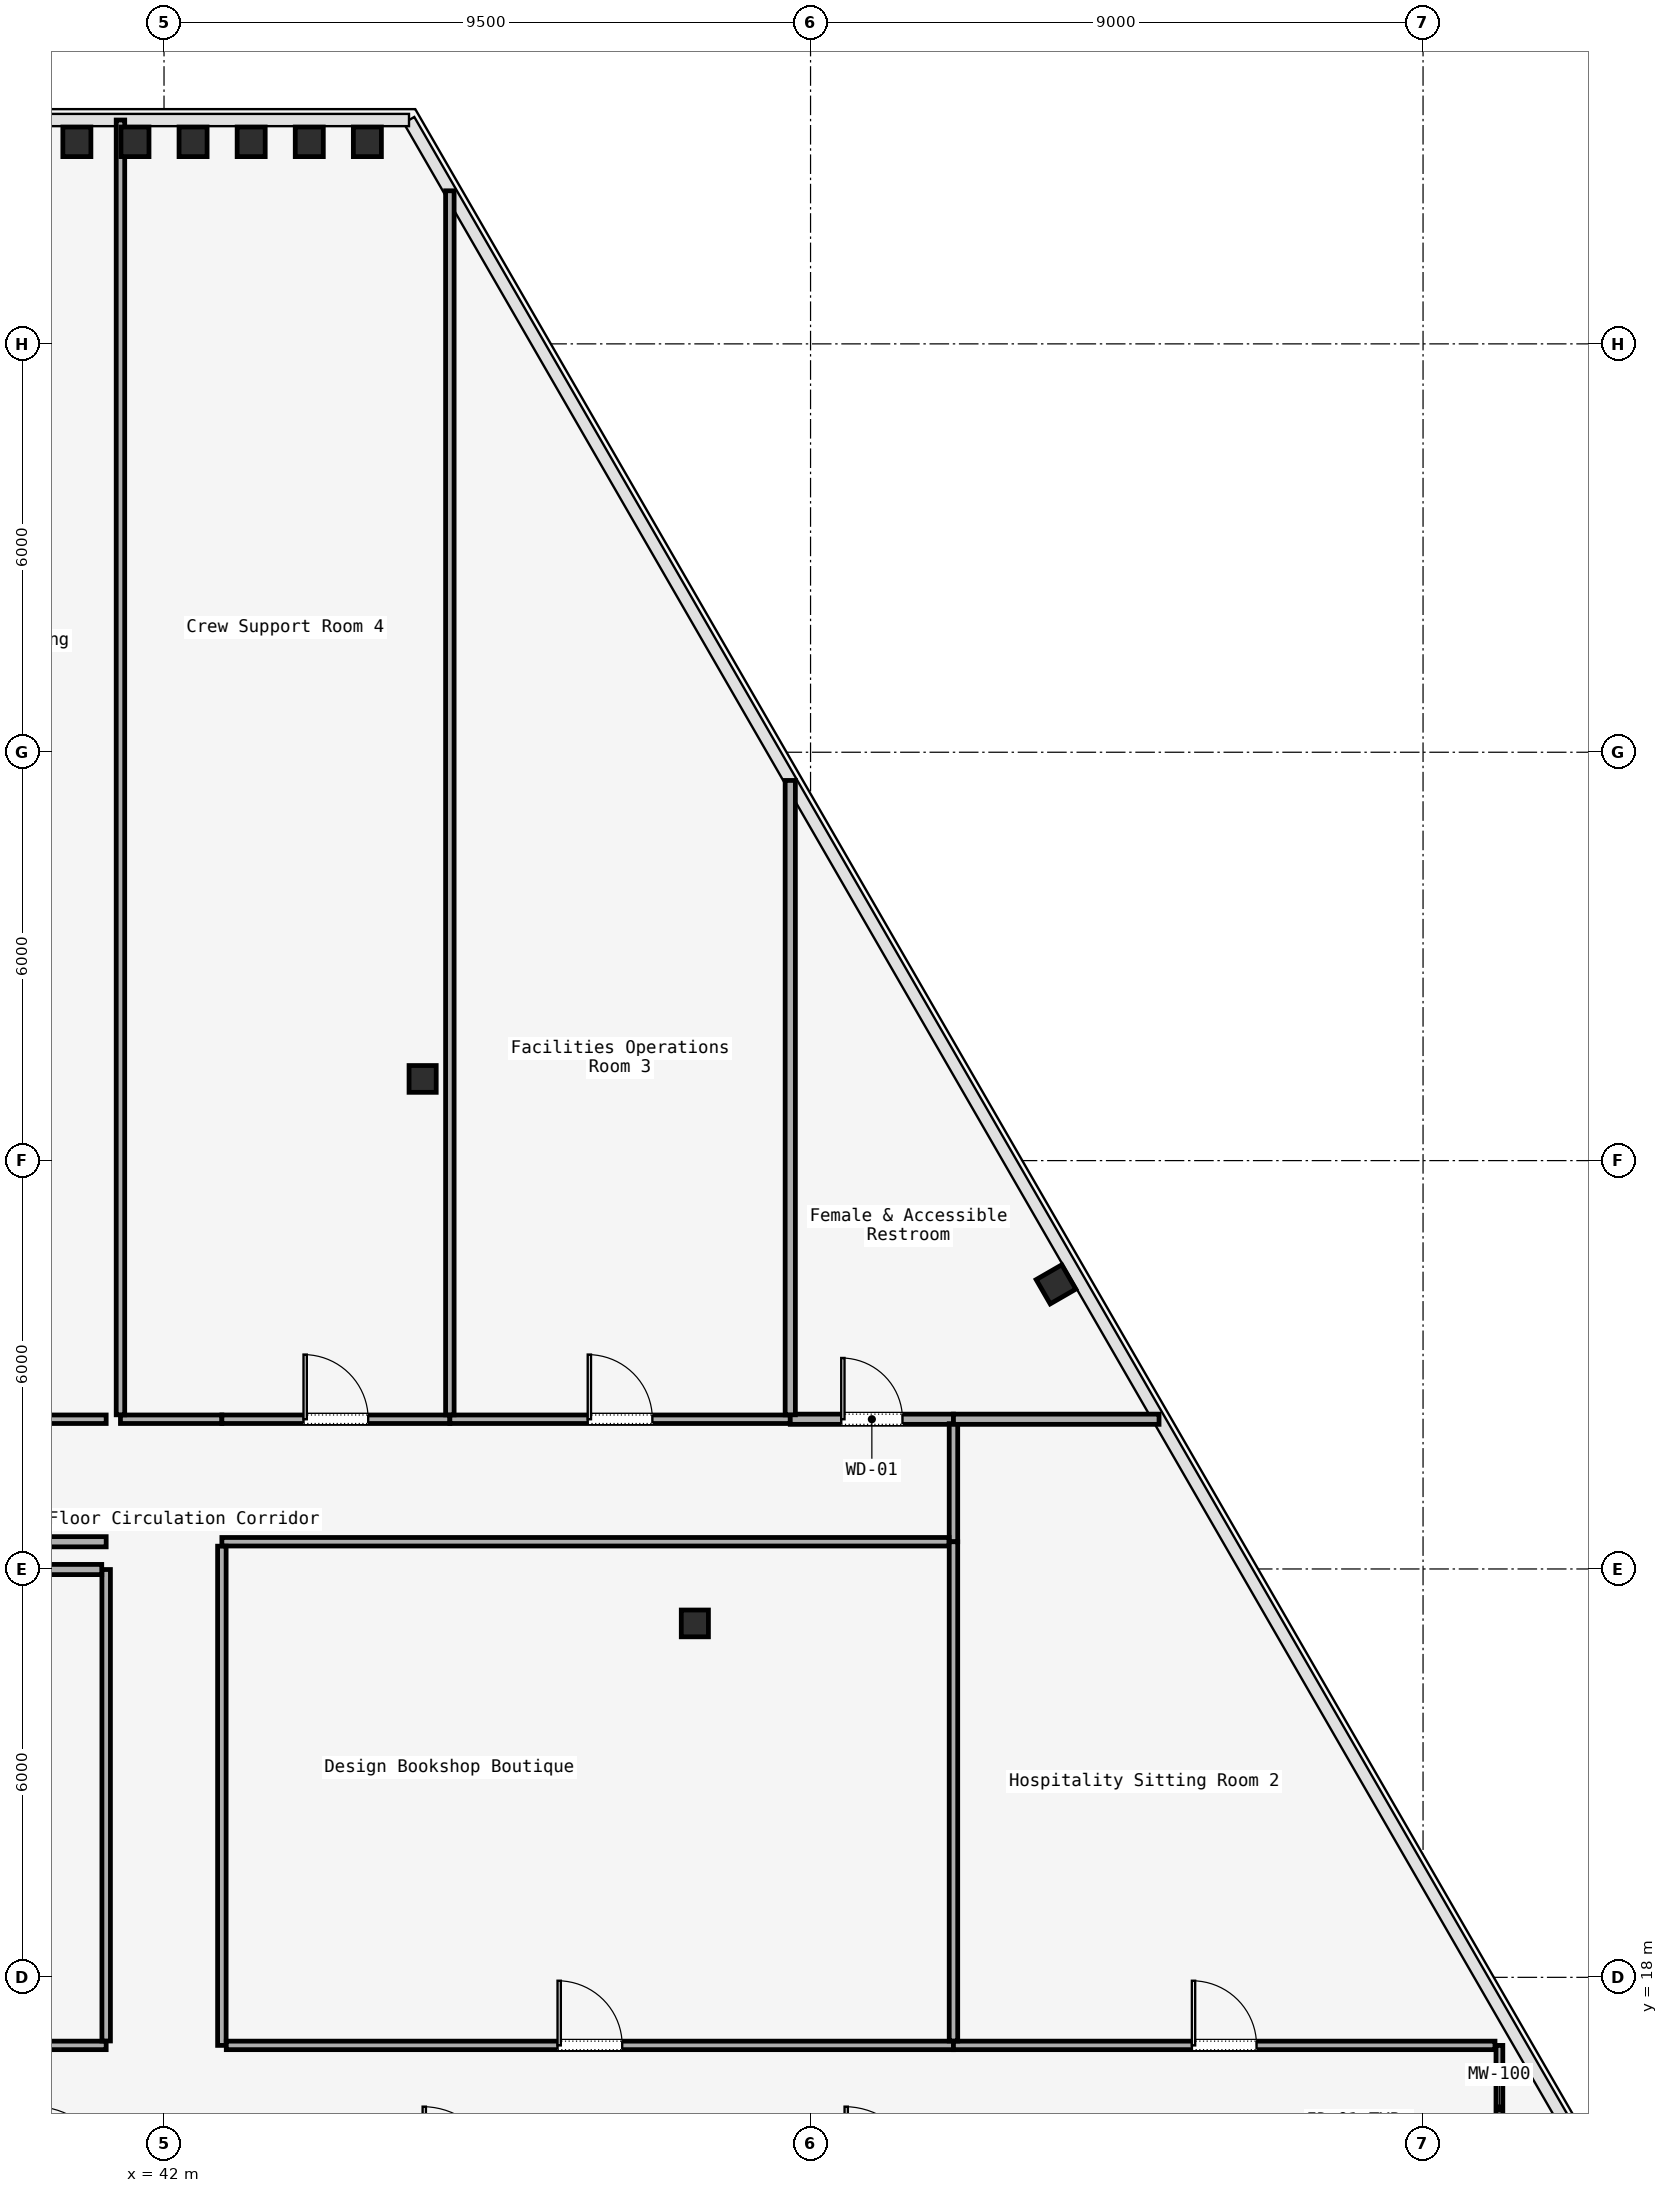
"""IFC4 building model, lengths in metres.
Left out: names, types, materials, properties, quantities, classifications, styles, units other than length and angle.
Written with IfcOpenShell. Run it as: python <this file> out.ifc"""

import sys

from ifc_helpers import new_model, si_unit, direction, frame, frame_2d, origin, origin_2d, place, context, subcontext, project, spatial, rectangle, i_section, extrude, element, fill, save


model = new_model("IFC4")
c1 = context("Model", 3, precision=1e-05, world=origin(), true_north=direction((0.0, 1.0)))
c2 = subcontext(c1, "Body", "Model", "MODEL_VIEW")
j1 = project(units=[si_unit("LENGTHUNIT", "METRE"), si_unit("PLANEANGLEUNIT", "RADIAN")], contexts=[c1])
p1 = place(None, origin())
s1 = spatial("IfcSite", under=j1, at=p1, CompositionType="ELEMENT")
p2 = place(p1, origin())
s2 = spatial("IfcBuilding", under=s1, at=p2, CompositionType="ELEMENT")
p3 = place(p2, frame((0.0, 0.0, 233.2)))
s3 = spatial("IfcBuildingStorey", under=s2, at=p3, CompositionType="ELEMENT", Elevation=233.2)
for number, where, z_axis, x_axis in (
    (1, (49.8, 23.2, 0.0), (0.0, 0.0, 1.0), (1.0, 0.0, 0.0)),
    (2, (45.8, 31.2, 0.0), (0.0, 0.0, 1.0), (1.0, 0.0, 0.0)),
):
    element("IfcColumn", number, at=place(p3, frame(where, z_axis=z_axis, x_axis=x_axis)), inside=s3, PredefinedType="COLUMN", context=c2, shape_type="SweptSolid", body=[
        extrude(i_section(OverallWidth=0.399, OverallDepth=0.394, WebThickness=0.023, FlangeThickness=0.037, FilletRadius=0.015, at=origin_2d()), origin(), (0.0, 0.0, 1.0), 3.58),
    ])
for number, where, z_axis, x_axis in (
    (3, (55.107, 28.182, 0.0), (0.0, 0.0, 1.0), (-0.5, 0.866, 0.0)),
    (4, (44.988, 44.969, 0.0), (0.0, 0.0, 1.0), (1.0, 0.0, 0.0)),
    (5, (44.135, 44.969, 0.0), (0.0, 0.0, 1.0), (1.0, 0.0, 0.0)),
    (6, (43.281, 44.969, 0.0), (0.0, 0.0, 1.0), (1.0, 0.0, 0.0)),
    (7, (42.427, 44.969, 0.0), (0.0, 0.0, 1.0), (1.0, 0.0, 0.0)),
    (8, (41.573, 44.969, 0.0), (0.0, 0.0, 1.0), (1.0, 0.0, 0.0)),
    (9, (40.719, 44.969, 0.0), (0.0, 0.0, 1.0), (1.0, 0.0, 0.0)),
):
    element("IfcColumn", number, at=place(p3, frame(where, z_axis=z_axis, x_axis=x_axis)), inside=s3, PredefinedType="COLUMN", context=c2, shape_type="SweptSolid", body=[
        extrude(i_section(OverallWidth=0.412, OverallDepth=0.435, WebThickness=0.036, FlangeThickness=0.044, FilletRadius=0.015, at=origin_2d()), origin(), (0.0, 0.0, 1.0), 3.58),
    ])
p4 = place(p3, frame((61.622, 17.0, 0.0), z_axis=(0.0, 0.0, 1.0), x_axis=(0.0, -1.0, 0.0)))
e10 = element("IfcWall", 10, at=p4, inside=s3, PredefinedType="MOVABLE", context=c2, shape_type="SweptSolid", body=[
    extrude(rectangle(XDim=1.85, YDim=0.1, at=frame_2d((0.925, 0.0))), origin(), (0.0, 0.0, 1.0), 3.01),
])
p5 = place(p3, frame((30.8, 17.0, 0.0), z_axis=(0.0, 0.0, 1.0), x_axis=(1.0, 0.0, 0.0)))
e11 = element("IfcWall", 11, at=p5, inside=s3, PredefinedType="PARTITIONING", context=c2, shape_type="SweptSolid", body=[
    extrude(rectangle(XDim=10.35, YDim=0.125, at=frame_2d((5.175, 0.0))), origin(), (0.0, 0.0, 1.0), 3.01),
])
p6 = place(p5, frame((4.7, 0.0, 0.0)))
e12 = element("IfcOpeningElement", 12, at=p6, cuts=e11, PredefinedType="OPENING", context=c2, shape_type="SweptSolid", body=[
    extrude(rectangle(XDim=0.95, YDim=2.2, at=frame_2d((0.475, 1.1))), frame((0.0, 0.062, 0.0), z_axis=(0.0, -1.0, 0.0), x_axis=(1.0, 0.0, 0.0)), (0.0, 0.0, 1.0), 0.125),
])
p7 = place(p3, frame((41.15, 17.065, 0.0), z_axis=(0.0, 0.0, 1.0), x_axis=(0.0, 1.0, 0.0)))
e13 = element("IfcWall", 13, at=p7, inside=s3, PredefinedType="PARTITIONING", context=c2, shape_type="SweptSolid", body=[
    extrude(rectangle(XDim=6.927, YDim=0.125, at=frame_2d((3.463, 0.0))), origin(), (0.0, 0.0, 1.0), 3.01),
])
p8 = place(p3, frame((41.15, 24.4, 0.0), z_axis=(0.0, 0.0, 1.0), x_axis=(-1.0, 0.0, 0.0)))
e14 = element("IfcWall", 14, at=p8, inside=s3, PredefinedType="PARTITIONING", context=c2, shape_type="SweptSolid", body=[
    extrude(rectangle(XDim=5.65, YDim=0.15, at=frame_2d((2.825, 0.0))), origin(), (0.0, 0.0, 1.0), 3.01),
])
p9 = place(p3, frame((37.4, 26.2, 0.0), z_axis=(0.0, 0.0, 1.0), x_axis=(1.0, 0.0, 0.0)))
e15 = element("IfcWall", 15, at=p9, inside=s3, PredefinedType="PARTITIONING", context=c2, shape_type="SweptSolid", body=[
    extrude(rectangle(XDim=3.75, YDim=0.125, at=frame_2d((1.875, 0.0))), origin(), (0.0, 0.0, 1.0), 3.01),
])
p10 = place(p9, frame((1.175, 0.0, 0.0)))
e16 = element("IfcOpeningElement", 16, at=p10, cuts=e15, PredefinedType="OPENING", context=c2, shape_type="SweptSolid", body=[
    extrude(rectangle(XDim=1.4, YDim=2.2, at=frame_2d((0.7, 1.1))), frame((0.0, 0.062, 0.0), z_axis=(0.0, -1.0, 0.0), x_axis=(1.0, 0.0, 0.0)), (0.0, 0.0, 1.0), 0.125),
])
p11 = place(p3, frame((41.36, 26.2, 0.0), z_axis=(0.0, 0.0, 1.0), x_axis=(1.0, 0.0, 0.0)))
e17 = element("IfcWall", 17, at=p11, inside=s3, PredefinedType="PARTITIONING", context=c2, shape_type="SweptSolid", body=[
    extrude(rectangle(XDim=1.49, YDim=0.125, at=frame_2d((0.745, 0.0))), origin(), (0.0, 0.0, 1.0), 3.01),
])
p12 = place(p3, frame((42.85, 26.2, 0.0), z_axis=(0.0, 0.0, 1.0), x_axis=(1.0, 0.0, 0.0)))
e18 = element("IfcWall", 18, at=p12, inside=s3, PredefinedType="PARTITIONING", context=c2, shape_type="SweptSolid", body=[
    extrude(rectangle(XDim=3.35, YDim=0.125, at=frame_2d((1.675, 0.0))), origin(), (0.0, 0.0, 1.0), 3.01),
])
p13 = place(p12, frame((1.2, 0.0, 0.0)))
e19 = element("IfcOpeningElement", 19, at=p13, cuts=e18, PredefinedType="OPENING", context=c2, shape_type="SweptSolid", body=[
    extrude(rectangle(XDim=0.95, YDim=2.2, at=frame_2d((0.475, 1.1))), frame((0.0, 0.062, 0.0), z_axis=(0.0, -1.0, 0.0), x_axis=(1.0, 0.0, 0.0)), (0.0, 0.0, 1.0), 0.125),
])
p14 = place(p3, frame((46.2, 26.2, 0.0), z_axis=(0.0, 0.0, 1.0), x_axis=(1.0, 0.0, 0.0)))
e20 = element("IfcWall", 20, at=p14, inside=s3, PredefinedType="PARTITIONING", context=c2, shape_type="SweptSolid", body=[
    extrude(rectangle(XDim=5.002, YDim=0.125, at=frame_2d((2.501, 0.0))), origin(), (0.0, 0.0, 1.0), 3.01),
])
p15 = place(p14, frame((2.026, 0.0, 0.0)))
e21 = element("IfcOpeningElement", 21, at=p15, cuts=e20, PredefinedType="OPENING", context=c2, shape_type="SweptSolid", body=[
    extrude(rectangle(XDim=0.95, YDim=2.2, at=frame_2d((0.475, 1.1))), frame((0.0, 0.062, 0.0), z_axis=(0.0, -1.0, 0.0), x_axis=(1.0, 0.0, 0.0)), (0.0, 0.0, 1.0), 0.125),
])
p16 = place(p3, frame((51.202, 26.2, 0.0), z_axis=(0.0, 0.0, 1.0), x_axis=(1.0, 0.0, 0.0)))
e22 = element("IfcWall", 22, at=p16, inside=s3, PredefinedType="PARTITIONING", context=c2, shape_type="SweptSolid", body=[
    extrude(rectangle(XDim=2.398, YDim=0.15, at=frame_2d((1.199, 0.0))), origin(), (0.0, 0.0, 1.0), 3.01),
])
p17 = place(p16, frame((0.749, 0.0, 0.0)))
e23 = element("IfcOpeningElement", 23, at=p17, cuts=e22, PredefinedType="OPENING", context=c2, shape_type="SweptSolid", body=[
    extrude(rectangle(XDim=0.9, YDim=2.15, at=frame_2d((0.45, 1.075))), frame((0.0, 0.075, 0.0), z_axis=(0.0, -1.0, 0.0), x_axis=(1.0, 0.0, 0.0)), (0.0, 0.0, 1.0), 0.15),
])
p18 = place(p3, frame((53.6, 26.135, 0.0), z_axis=(0.0, 0.0, 1.0), x_axis=(0.0, -1.0, 0.0)))
e24 = element("IfcWall", 24, at=p18, inside=s3, PredefinedType="PARTITIONING", context=c2, shape_type="SweptSolid", body=[
    extrude(rectangle(XDim=1.735, YDim=0.125, at=frame_2d((0.868, 0.0))), origin(), (0.0, 0.0, 1.0), 3.01),
])
p19 = place(p3, frame((53.535, 24.4, 0.0), z_axis=(0.0, 0.0, 1.0), x_axis=(-1.0, 0.0, 0.0)))
e25 = element("IfcWall", 25, at=p19, inside=s3, PredefinedType="PARTITIONING", context=c2, shape_type="SweptSolid", body=[
    extrude(rectangle(XDim=10.685, YDim=0.125, at=frame_2d((5.342, 0.0))), origin(), (0.0, 0.0, 1.0), 3.01),
])
p20 = place(p3, frame((42.85, 24.335, 0.0), z_axis=(0.0, 0.0, 1.0), x_axis=(0.0, -1.0, 0.0)))
e26 = element("IfcWall", 26, at=p20, inside=s3, PredefinedType="PARTITIONING", context=c2, shape_type="SweptSolid", body=[
    extrude(rectangle(XDim=7.335, YDim=0.125, at=frame_2d((3.667, 0.0))), origin(), (0.0, 0.0, 1.0), 3.01),
])
p21 = place(p3, frame((42.915, 17.0, 0.0), z_axis=(0.0, 0.0, 1.0), x_axis=(1.0, 0.0, 0.0)))
e27 = element("IfcWall", 27, at=p21, inside=s3, PredefinedType="PARTITIONING", context=c2, shape_type="SweptSolid", body=[
    extrude(rectangle(XDim=10.685, YDim=0.125, at=frame_2d((5.343, 0.0))), origin(), (0.0, 0.0, 1.0), 3.01),
])
p22 = place(p21, frame((4.867, 0.0, 0.0)))
e28 = element("IfcOpeningElement", 28, at=p22, cuts=e27, PredefinedType="OPENING", context=c2, shape_type="SweptSolid", body=[
    extrude(rectangle(XDim=0.95, YDim=2.2, at=frame_2d((0.475, 1.1))), frame((0.0, 0.062, 0.0), z_axis=(0.0, -1.0, 0.0), x_axis=(1.0, 0.0, 0.0)), (0.0, 0.0, 1.0), 0.125),
])
p23 = place(p3, frame((53.6, 17.0, 0.0), z_axis=(0.0, 0.0, 1.0), x_axis=(1.0, 0.0, 0.0)))
e29 = element("IfcWall", 29, at=p23, inside=s3, PredefinedType="PARTITIONING", context=c2, shape_type="SweptSolid", body=[
    extrude(rectangle(XDim=7.957, YDim=0.125, at=frame_2d((3.979, 0.0))), origin(), (0.0, 0.0, 1.0), 3.01),
])
p24 = place(p23, frame((3.503, 0.0, 0.0)))
e30 = element("IfcOpeningElement", 30, at=p24, cuts=e29, PredefinedType="OPENING", context=c2, shape_type="SweptSolid", body=[
    extrude(rectangle(XDim=0.95, YDim=2.2, at=frame_2d((0.475, 1.1))), frame((0.0, 0.062, 0.0), z_axis=(0.0, -1.0, 0.0), x_axis=(1.0, 0.0, 0.0)), (0.0, 0.0, 1.0), 0.125),
])
p25 = place(p3, frame((30.865, 23.992, 0.0), z_axis=(0.0, 0.0, 1.0), x_axis=(1.0, 0.0, 0.0)))
e31 = element("IfcWall", 31, at=p25, inside=s3, PredefinedType="PARTITIONING", context=c2, shape_type="SweptSolid", body=[
    extrude(rectangle(XDim=10.22, YDim=0.15, at=frame_2d((5.11, 0.0))), origin(), (0.0, 0.0, 1.0), 3.01),
])
p26 = place(p3, frame((53.6, 24.4, 0.0), z_axis=(0.0, 0.0, 1.0), x_axis=(0.0, -1.0, 0.0)))
e32 = element("IfcWall", 32, at=p26, inside=s3, PredefinedType="PARTITIONING", context=c2, shape_type="SweptSolid", body=[
    extrude(rectangle(XDim=7.335, YDim=0.125, at=frame_2d((3.667, 0.0))), origin(), (0.0, 0.0, 1.0), 3.01),
])
p27 = place(p3, frame((53.6, 26.2, 0.0), z_axis=(0.0, 0.0, 1.0), x_axis=(1.0, 0.0, 0.0)))
e33 = element("IfcWall", 33, at=p27, inside=s3, PredefinedType="PARTITIONING", context=c2, shape_type="SweptSolid", body=[
    extrude(rectangle(XDim=3.021, YDim=0.15, at=frame_2d((1.51, 0.0))), origin(), (0.0, 0.0, 1.0), 3.01),
])
p28 = place(p3, frame((51.202, 26.265, 0.0), z_axis=(0.0, 0.0, 1.0), x_axis=(0.0, 1.0, 0.0)))
e34 = element("IfcWall", 34, at=p28, inside=s3, PredefinedType="PARTITIONING", context=c2, shape_type="SweptSolid", body=[
    extrude(rectangle(XDim=9.321, YDim=0.15, at=frame_2d((4.66, 0.0))), origin(), (0.0, 0.0, 1.0), 3.01),
])
p29 = place(p3, frame((46.2, 26.265, 0.0), z_axis=(0.0, 0.0, 1.0), x_axis=(0.0, 1.0, 0.0)))
e35 = element("IfcWall", 35, at=p29, inside=s3, PredefinedType="PARTITIONING", context=c2, shape_type="SweptSolid", body=[
    extrude(rectangle(XDim=17.984, YDim=0.125, at=frame_2d((8.992, 0.0))), origin(), (0.0, 0.0, 1.0), 3.01),
])
p30 = place(p3, frame((41.36, 45.289, 0.0), z_axis=(0.0, 0.0, 1.0), x_axis=(0.0, -1.0, 0.0)))
e36 = element("IfcWall", 36, at=p30, inside=s3, PredefinedType="PARTITIONING", context=c2, shape_type="SweptSolid", body=[
    extrude(rectangle(XDim=19.024, YDim=0.125, at=frame_2d((9.512, 0.0))), origin(), (0.0, 0.0, 1.0), 3.01),
])
p31 = place(p22, origin())
e37 = element("IfcDoor", 37, at=p31, inside=s3, OperationType="SINGLE_SWING_RIGHT", PredefinedType="DOOR", context=c2, shape_type="SweptSolid", body=[
    extrude(rectangle(XDim=0.95, YDim=2.2, at=frame_2d((0.475, 1.1))), frame((0.0, 0.025, 0.0), z_axis=(0.0, -1.0, 0.0), x_axis=(1.0, 0.0, 0.0)), (0.0, 0.0, 1.0), 0.05),
])
fill(e28, e37)
p32 = place(p24, origin())
e38 = element("IfcDoor", 38, at=p32, inside=s3, OperationType="SINGLE_SWING_LEFT", PredefinedType="DOOR", context=c2, shape_type="SweptSolid", body=[
    extrude(rectangle(XDim=0.95, YDim=2.2, at=frame_2d((0.475, 1.1))), frame((0.0, 0.025, 0.0), z_axis=(0.0, -1.0, 0.0), x_axis=(1.0, 0.0, 0.0)), (0.0, 0.0, 1.0), 0.05),
])
fill(e30, e38)
p33 = place(p17, origin())
e39 = element("IfcDoor", 39, at=p33, inside=s3, OperationType="SINGLE_SWING_RIGHT", PredefinedType="DOOR", context=c2, shape_type="SweptSolid", body=[
    extrude(rectangle(XDim=0.9, YDim=2.15, at=frame_2d((0.45, 1.075))), frame((0.0, 0.025, 0.0), z_axis=(0.0, -1.0, 0.0), x_axis=(1.0, 0.0, 0.0)), (0.0, 0.0, 1.0), 0.05),
])
fill(e23, e39)
p34 = place(p15, origin())
e40 = element("IfcDoor", 40, at=p34, inside=s3, OperationType="SINGLE_SWING_RIGHT", PredefinedType="DOOR", context=c2, shape_type="SweptSolid", body=[
    extrude(rectangle(XDim=0.95, YDim=2.2, at=frame_2d((0.475, 1.1))), frame((0.0, 0.025, 0.0), z_axis=(0.0, -1.0, 0.0), x_axis=(1.0, 0.0, 0.0)), (0.0, 0.0, 1.0), 0.05),
])
fill(e21, e40)
p35 = place(p13, origin())
e41 = element("IfcDoor", 41, at=p35, inside=s3, OperationType="SINGLE_SWING_RIGHT", PredefinedType="DOOR", context=c2, shape_type="SweptSolid", body=[
    extrude(rectangle(XDim=0.95, YDim=2.2, at=frame_2d((0.475, 1.1))), frame((0.0, 0.025, 0.0), z_axis=(0.0, -1.0, 0.0), x_axis=(1.0, 0.0, 0.0)), (0.0, 0.0, 1.0), 0.05),
])
fill(e19, e41)
save(model, sys.argv[1])
